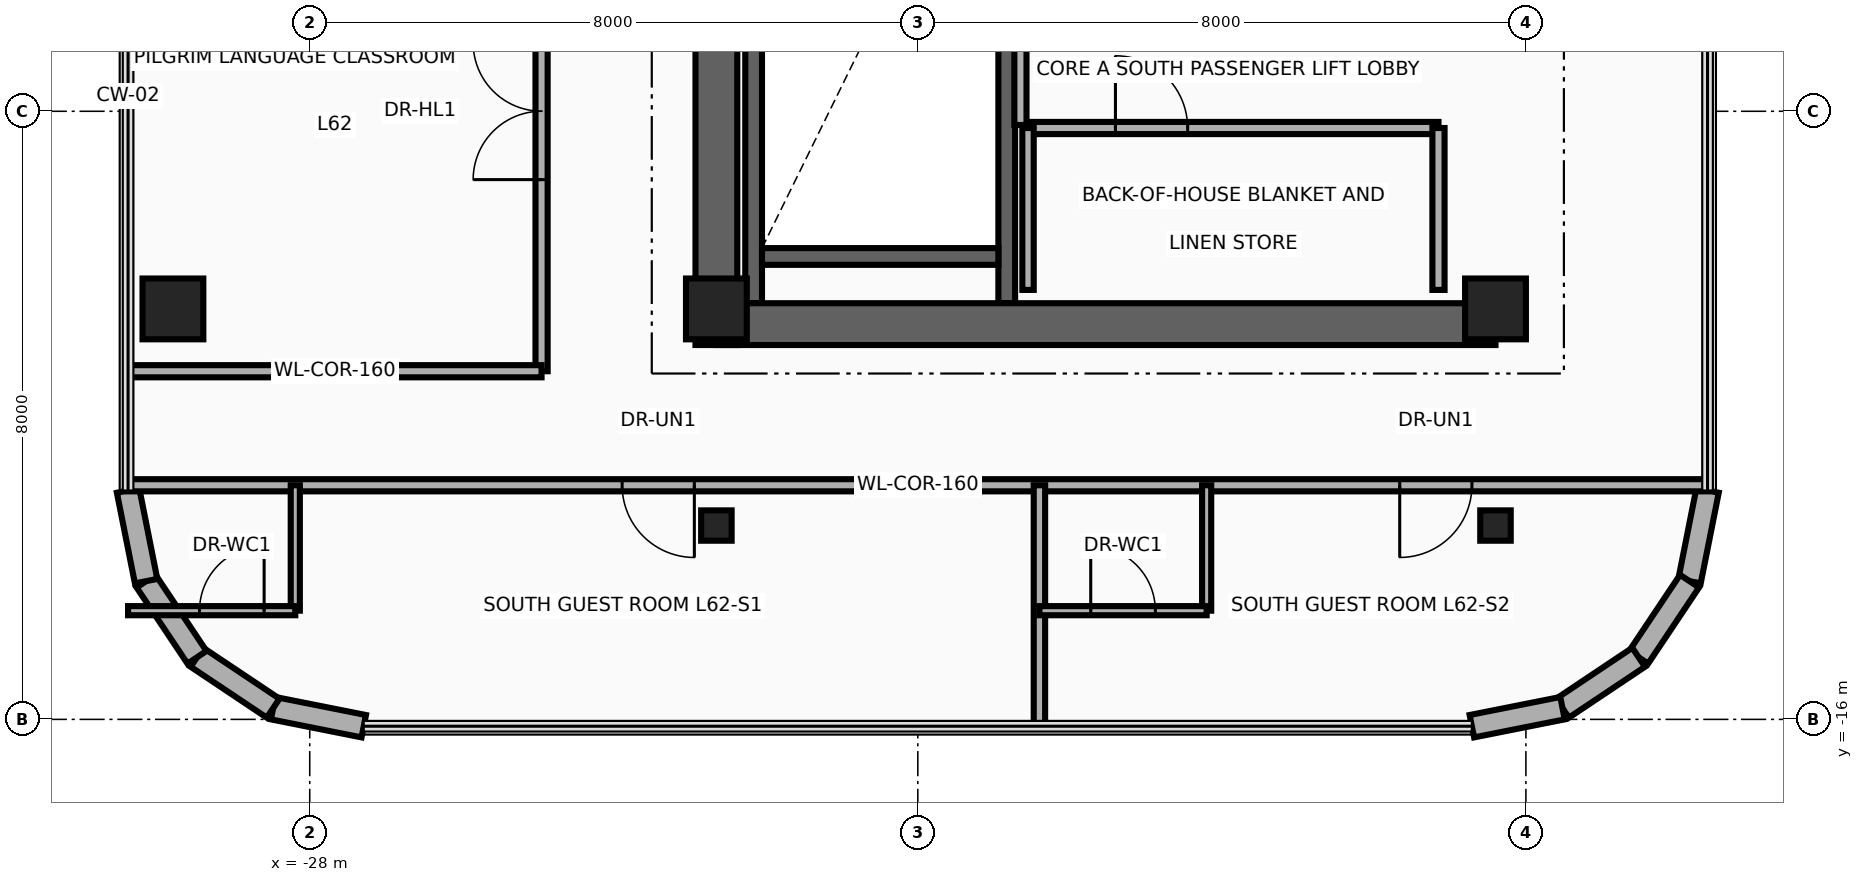
"""IFC4 building model, lengths in metres.
Left out: names, types, materials, properties, quantities, classifications, styles, units other than length and angle.
Written with IfcOpenShell. Run it as: python <this file> out.ifc"""

import sys

from ifc_helpers import new_model, si_unit, direction, frame, frame_2d, origin, origin_2d, place, context, subcontext, project, spatial, rectangle, i_section, extrude, source, transform, mapped, element, fill, save


model = new_model("IFC4")
c1 = context("Model", 3, precision=1e-05, world=origin(), true_north=direction((0.0, 1.0)))
c2 = subcontext(c1, "Body", "Model", "MODEL_VIEW")
j1 = project(units=[si_unit("LENGTHUNIT", "METRE"), si_unit("PLANEANGLEUNIT", "RADIAN")], contexts=[c1])
p1 = place(None, origin())
s1 = spatial("IfcSite", under=j1, at=p1, CompositionType="ELEMENT")
p2 = place(p1, origin())
s2 = spatial("IfcBuilding", under=s1, at=p2, CompositionType="ELEMENT")
p3 = place(p2, frame((0.0, 0.0, 240.5)))
s3 = spatial("IfcBuildingStorey", under=s2, at=p3, CompositionType="ELEMENT", Elevation=240.5)
for number, where, z_axis, x_axis in (
    (1, (-22.16, -10.525, 0.0), (0.0, 0.0, 1.0), (0.0, 1.0, 0.0)),
    (2, (-18.83, -10.525, 0.0), (0.0, 0.0, 1.0), (0.0, 1.0, 0.0)),
):
    element("IfcWall", number, at=place(p3, frame(where, z_axis=z_axis, x_axis=x_axis)), inside=s3, PredefinedType="SHEAR", context=c2, shape_type="SweptSolid", body=[
        extrude(rectangle(XDim=8.745, YDim=0.22, at=frame_2d((4.373, 0.0))), origin(), (0.0, 0.0, 1.0), 3.26),
    ])
p4 = place(p3, frame((-22.05, -9.91, 0.0), z_axis=(0.0, 0.0, 1.0), x_axis=(1.0, 0.0, 0.0)))
e3 = element("IfcWall", 3, at=p4, inside=s3, PredefinedType="SHEAR", context=c2, shape_type="SweptSolid", body=[
    extrude(rectangle(XDim=3.11, YDim=0.22, at=frame_2d((1.555, 0.0))), origin(), (0.0, 0.0, 1.0), 3.26),
])
p5 = place(p3, frame((-22.65, -11.075, 0.0), z_axis=(0.0, 0.0, 1.0), x_axis=(0.0, 1.0, 0.0)))
e4 = element("IfcWall", 4, at=p5, inside=s3, PredefinedType="SHEAR", context=c2, shape_type="SweptSolid", body=[
    extrude(rectangle(XDim=22.15, YDim=0.55, at=frame_2d((11.075, 0.0))), origin(), (0.0, 0.0, 1.0), 3.26),
])
p6 = place(p3, frame((-22.65, -10.8, 0.0), z_axis=(0.0, 0.0, 1.0), x_axis=(1.0, 0.0, 0.0)))
e5 = element("IfcWall", 5, at=p6, inside=s3, PredefinedType="SHEAR", context=c2, shape_type="SweptSolid", body=[
    extrude(rectangle(XDim=10.25, YDim=0.55, at=frame_2d((5.125, 0.0))), origin(), (0.0, 0.0, 1.0), 3.26),
])
m1 = source(origin(), c2, "Body", "SweptSolid", [
    extrude(rectangle(XDim=0.8, YDim=0.8, at=origin_2d()), origin(), (0.0, 0.0, 1.0), 3.5),
])
for number, where, z_axis, x_axis in (
    (6, (-29.8, -10.6, 0.0), (0.0, 0.0, 1.0), (1.0, 0.0, 0.0)),
    (7, (-22.65, -10.6, 0.0), (0.0, 0.0, 1.0), (1.0, 0.0, 0.0)),
    (8, (-12.4, -10.6, 0.0), (0.0, 0.0, 1.0), (1.0, 0.0, 0.0)),
):
    element("IfcColumn", number, at=place(p3, frame(where, z_axis=z_axis, x_axis=x_axis)), inside=s3, PredefinedType="COLUMN", context=c2, shape_type="MappedRepresentation", body=[
        mapped(m1, transform((0.0, 0.0, 0.0), x_axis=(1.0, 0.0, 0.0), y_axis=(0.0, 1.0, 0.0), z_axis=(0.0, 0.0, 1.0), scale=1.0)),
    ])
m2 = source(origin(), c2, "Body", "SweptSolid", [
    extrude(i_section(OverallWidth=0.401, OverallDepth=0.399, WebThickness=0.025, FlangeThickness=0.04, at=origin_2d()), origin(), (0.0, 0.0, 1.0), 3.5),
])
for number, where, z_axis, x_axis in (
    (9, (-22.65, -13.45, 0.0), (0.0, 0.0, 1.0), (1.0, 0.0, 0.0)),
    (10, (-12.4, -13.45, 0.0), (0.0, 0.0, 1.0), (1.0, 0.0, 0.0)),
):
    element("IfcColumn", number, at=place(p3, frame(where, z_axis=z_axis, x_axis=x_axis)), inside=s3, PredefinedType="COLUMN", context=c2, shape_type="MappedRepresentation", body=[
        mapped(m2, transform((0.0, 0.0, 0.0), x_axis=(1.0, 0.0, 0.0), y_axis=(0.0, 1.0, 0.0), z_axis=(0.0, 0.0, 1.0), scale=1.0)),
    ])
p7 = place(p3, frame((-9.61, -12.989, 0.0), z_axis=(0.0, 0.0, 1.0), x_axis=(-0.194996050505, -0.980804027463, 0.0)))
e11 = element("IfcWall", 11, at=p7, inside=s3, PredefinedType="SOLIDWALL", context=c2, shape_type="SweptSolid", body=[
    extrude(rectangle(XDim=1.216, YDim=0.3, at=frame_2d((0.608, 0.0))), origin(), (0.0, 0.0, 1.0), 3.26),
])
for number, where, z_axis, x_axis in (
    (12, (-9.847, -14.182, 0.0), (0.0, 0.0, 1.0), (-0.556, -0.831, 0.0)),
    (13, (-10.517, -15.183, 0.0), (0.0, 0.0, 1.0), (-0.831, -0.556, 0.0)),
):
    element("IfcWall", number, at=place(p3, frame(where, z_axis=z_axis, x_axis=x_axis)), inside=s3, PredefinedType="SOLIDWALL", context=c2, shape_type="SweptSolid", body=[
        extrude(rectangle(XDim=1.205, YDim=0.3, at=frame_2d((0.603, 0.0))), origin(), (0.0, 0.0, 1.0), 3.26),
    ])
for number, where, z_axis, x_axis in (
    (14, (-11.518, -15.853, 0.0), (0.0, 0.0, 1.0), (-0.981, -0.195, 0.0)),
    (15, (-27.289, -16.09, 0.0), (0.0, 0.0, 1.0), (-0.981, 0.195, 0.0)),
):
    element("IfcWall", number, at=place(p3, frame(where, z_axis=z_axis, x_axis=x_axis)), inside=s3, PredefinedType="SOLIDWALL", context=c2, shape_type="SweptSolid", body=[
        extrude(rectangle(XDim=1.216, YDim=0.3, at=frame_2d((0.608, 0.0))), origin(), (0.0, 0.0, 1.0), 3.26),
    ])
for number, where, z_axis, x_axis in (
    (16, (-28.482, -15.853, 0.0), (0.0, 0.0, 1.0), (-0.831, 0.556, 0.0)),
    (17, (-29.483, -15.183, 0.0), (0.0, 0.0, 1.0), (-0.556, 0.831, 0.0)),
):
    element("IfcWall", number, at=place(p3, frame(where, z_axis=z_axis, x_axis=x_axis)), inside=s3, PredefinedType="SOLIDWALL", context=c2, shape_type="SweptSolid", body=[
        extrude(rectangle(XDim=1.205, YDim=0.3, at=frame_2d((0.603, 0.0))), origin(), (0.0, 0.0, 1.0), 3.26),
    ])
p8 = place(p3, frame((-30.153, -14.182, 0.0), z_axis=(0.0, 0.0, 1.0), x_axis=(-0.194996050505, 0.980804027463, 0.0)))
e18 = element("IfcWall", 18, at=p8, inside=s3, PredefinedType="SOLIDWALL", context=c2, shape_type="SweptSolid", body=[
    extrude(rectangle(XDim=1.216, YDim=0.3, at=frame_2d((0.608, 0.0))), origin(), (0.0, 0.0, 1.0), 3.26),
])
p9 = place(p3, frame((-18.65, -8.18, 0.0), z_axis=(0.0, 0.0, 1.0), x_axis=(0.0, 1.0, 0.0)))
e19 = element("IfcWall", 19, at=p9, inside=s3, PredefinedType="PARTITIONING", context=c2, shape_type="SweptSolid", body=[
    extrude(rectangle(XDim=1.56, YDim=0.16, at=frame_2d((0.78, 0.0))), origin(), (0.0, 0.0, 1.0), 3.26),
])
p10 = place(p3, frame((-18.55, -8.22, 0.0), z_axis=(0.0, 0.0, 1.0), x_axis=(1.0, 0.0, 0.0)))
e20 = element("IfcWall", 20, at=p10, inside=s3, PredefinedType="PARTITIONING", context=c2, shape_type="SweptSolid", body=[
    extrude(rectangle(XDim=5.4, YDim=0.16, at=frame_2d((2.7, 0.0))), origin(), (0.0, 0.0, 1.0), 3.26),
])
p11 = place(p10, frame((1.15, 0.0, 0.0)))
e21 = element("IfcOpeningElement", 21, at=p11, cuts=e20, PredefinedType="OPENING", context=c2, shape_type="SweptSolid", body=[
    extrude(rectangle(XDim=0.95, YDim=2.15, at=frame_2d((0.475, 1.075))), frame((0.0, 0.095, 0.0), z_axis=(0.0, -1.0, 0.0), x_axis=(1.0, 0.0, 0.0)), (0.0, 0.0, 1.0), 0.19),
])
p12 = place(p3, frame((-18.55, -10.35, 0.0), z_axis=(0.0, 0.0, 1.0), x_axis=(0.0, 1.0, 0.0)))
e22 = element("IfcWall", 22, at=p12, inside=s3, PredefinedType="PARTITIONING", context=c2, shape_type="SweptSolid", body=[
    extrude(rectangle(XDim=2.13, YDim=0.15, at=frame_2d((1.065, 0.0))), origin(), (0.0, 0.0, 1.0), 3.26),
])
p13 = place(p3, frame((-13.15, -10.35, 0.0), z_axis=(0.0, 0.0, 1.0), x_axis=(0.0, 1.0, 0.0)))
e23 = element("IfcWall", 23, at=p13, inside=s3, PredefinedType="PARTITIONING", context=c2, shape_type="SweptSolid", body=[
    extrude(rectangle(XDim=2.13, YDim=0.16, at=frame_2d((1.065, 0.0))), origin(), (0.0, 0.0, 1.0), 3.26),
])
p14 = place(p3, frame((-24.95, -11.42, 0.0), z_axis=(0.0, 0.0, 1.0), x_axis=(0.0, 1.0, 0.0)))
e24 = element("IfcWall", 24, at=p14, inside=s3, PredefinedType="PARTITIONING", context=c2, shape_type="SweptSolid", body=[
    extrude(rectangle(XDim=20.22, YDim=0.16, at=frame_2d((10.11, 0.0))), origin(), (0.0, 0.0, 1.0), 2.544),
])
p15 = place(p14, frame((2.521, 0.0, 0.0)))
e25 = element("IfcOpeningElement", 25, at=p15, cuts=e24, PredefinedType="OPENING", context=c2, shape_type="SweptSolid", body=[
    extrude(rectangle(XDim=1.8, YDim=2.15, at=frame_2d((0.9, 1.075))), frame((0.0, 0.095, 0.0), z_axis=(0.0, -1.0, 0.0), x_axis=(1.0, 0.0, 0.0)), (0.0, 0.0, 1.0), 0.19),
])
p16 = place(p14, frame((9.124, 0.0, 0.0)))
e26 = element("IfcOpeningElement", 26, at=p16, cuts=e24, PredefinedType="OPENING", context=c2, shape_type="SweptSolid", body=[
    extrude(rectangle(XDim=0.95, YDim=2.15, at=frame_2d((0.475, 1.075))), frame((0.0, 0.095, 0.0), z_axis=(0.0, -1.0, 0.0), x_axis=(1.0, 0.0, 0.0)), (0.0, 0.0, 1.0), 0.19),
])
p17 = place(p14, frame((17.813, 0.0, 0.0)))
e27 = element("IfcOpeningElement", 27, at=p17, cuts=e24, PredefinedType="OPENING", context=c2, shape_type="SweptSolid", body=[
    extrude(rectangle(XDim=0.95, YDim=2.15, at=frame_2d((0.475, 1.075))), frame((0.0, 0.095, 0.0), z_axis=(0.0, -1.0, 0.0), x_axis=(1.0, 0.0, 0.0)), (0.0, 0.0, 1.0), 0.19),
])
p18 = place(p3, frame((-30.39, -12.92, 0.0), z_axis=(0.0, 0.0, 1.0), x_axis=(1.0, 0.0, 0.0)))
e28 = element("IfcWall", 28, at=p18, inside=s3, PredefinedType="PARTITIONING", context=c2, shape_type="SweptSolid", body=[
    extrude(rectangle(XDim=20.78, YDim=0.16, at=frame_2d((10.39, 0.0))), origin(), (0.0, 0.0, 1.0), 2.634),
])
p19 = place(p18, frame((6.5, 0.0, 0.0)))
e29 = element("IfcOpeningElement", 29, at=p19, cuts=e28, PredefinedType="OPENING", context=c2, shape_type="SweptSolid", body=[
    extrude(rectangle(XDim=0.95, YDim=2.15, at=frame_2d((0.475, 1.075))), frame((0.0, 0.095, 0.0), z_axis=(0.0, -1.0, 0.0), x_axis=(1.0, 0.0, 0.0)), (0.0, 0.0, 1.0), 0.19),
])
p20 = place(p18, frame((16.73, 0.0, 0.0)))
e30 = element("IfcOpeningElement", 30, at=p20, cuts=e28, PredefinedType="OPENING", context=c2, shape_type="SweptSolid", body=[
    extrude(rectangle(XDim=0.95, YDim=2.15, at=frame_2d((0.475, 1.075))), frame((0.0, 0.095, 0.0), z_axis=(0.0, -1.0, 0.0), x_axis=(1.0, 0.0, 0.0)), (0.0, 0.0, 1.0), 0.19),
])
p21 = place(p3, frame((-18.4, -16.09, 0.0), z_axis=(0.0, 0.0, 1.0), x_axis=(0.0, 1.0, 0.0)))
e31 = element("IfcWall", 31, at=p21, inside=s3, PredefinedType="PARTITIONING", context=c2, shape_type="SweptSolid", body=[
    extrude(rectangle(XDim=3.17, YDim=0.15, at=frame_2d((1.585, 0.0))), origin(), (0.0, 0.0, 1.0), 2.706),
])
p22 = place(p3, frame((-28.19, -14.57, 0.0), z_axis=(0.0, 0.0, 1.0), x_axis=(0.0, 1.0, 0.0)))
e32 = element("IfcWall", 32, at=p22, inside=s3, PredefinedType="PARTITIONING", context=c2, shape_type="SweptSolid", body=[
    extrude(rectangle(XDim=1.65, YDim=0.12, at=frame_2d((0.825, 0.0))), origin(), (0.0, 0.0, 1.0), 3.26),
])
p23 = place(p3, frame((-30.39, -14.57, 0.0), z_axis=(0.0, 0.0, 1.0), x_axis=(1.0, 0.0, 0.0)))
e33 = element("IfcWall", 33, at=p23, inside=s3, PredefinedType="PARTITIONING", context=c2, shape_type="SweptSolid", body=[
    extrude(rectangle(XDim=2.2, YDim=0.12, at=frame_2d((1.1, 0.0))), origin(), (0.0, 0.0, 1.0), 3.26),
])
p24 = place(p23, frame((0.94, 0.0, 0.0)))
e34 = element("IfcOpeningElement", 34, at=p24, cuts=e33, PredefinedType="OPENING", context=c2, shape_type="SweptSolid", body=[
    extrude(rectangle(XDim=0.85, YDim=2.1, at=frame_2d((0.425, 1.05))), frame((0.0, 0.075, 0.0), z_axis=(0.0, -1.0, 0.0), x_axis=(1.0, 0.0, 0.0)), (0.0, 0.0, 1.0), 0.15),
])
p25 = place(p3, frame((-16.2, -14.57, 0.0), z_axis=(0.0, 0.0, 1.0), x_axis=(0.0, 1.0, 0.0)))
e35 = element("IfcWall", 35, at=p25, inside=s3, PredefinedType="PARTITIONING", context=c2, shape_type="SweptSolid", body=[
    extrude(rectangle(XDim=1.65, YDim=0.12, at=frame_2d((0.825, 0.0))), origin(), (0.0, 0.0, 1.0), 2.706),
])
p26 = place(p3, frame((-18.4, -14.57, 0.0), z_axis=(0.0, 0.0, 1.0), x_axis=(1.0, 0.0, 0.0)))
e36 = element("IfcWall", 36, at=p26, inside=s3, PredefinedType="PARTITIONING", context=c2, shape_type="SweptSolid", body=[
    extrude(rectangle(XDim=2.2, YDim=0.12, at=frame_2d((1.1, 0.0))), origin(), (0.0, 0.0, 1.0), 3.26),
])
p27 = place(p26, frame((0.675, 0.0, 0.0)))
e37 = element("IfcOpeningElement", 37, at=p27, cuts=e36, PredefinedType="OPENING", context=c2, shape_type="SweptSolid", body=[
    extrude(rectangle(XDim=0.85, YDim=2.1, at=frame_2d((0.425, 1.05))), frame((0.0, 0.075, 0.0), z_axis=(0.0, -1.0, 0.0), x_axis=(1.0, 0.0, 0.0)), (0.0, 0.0, 1.0), 0.15),
])
p28 = place(p3, frame((-30.39, -11.42, 0.0), z_axis=(0.0, 0.0, 1.0), x_axis=(1.0, 0.0, 0.0)))
e38 = element("IfcWall", 38, at=p28, inside=s3, PredefinedType="PARTITIONING", context=c2, shape_type="SweptSolid", body=[
    extrude(rectangle(XDim=5.44, YDim=0.16, at=frame_2d((2.72, 0.0))), origin(), (0.0, 0.0, 1.0), 3.26),
])
p29 = place(p11, origin())
e39 = element("IfcDoor", 39, at=p29, inside=s3, OperationType="SINGLE_SWING_RIGHT", PredefinedType="DOOR", context=c2, shape_type="SweptSolid", body=[
    extrude(rectangle(XDim=0.95, YDim=2.15, at=frame_2d((0.475, 1.075))), frame((0.0, 0.025, 0.0), z_axis=(0.0, -1.0, 0.0), x_axis=(1.0, 0.0, 0.0)), (0.0, 0.0, 1.0), 0.05),
])
fill(e21, e39)
p30 = place(p15, origin())
e40 = element("IfcDoor", 40, at=p30, inside=s3, OperationType="DOUBLE_DOOR_SINGLE_SWING", PredefinedType="DOOR", context=c2, shape_type="SweptSolid", body=[
    extrude(rectangle(XDim=1.8, YDim=2.15, at=frame_2d((0.9, 1.075))), frame((0.0, 0.025, 0.0), z_axis=(0.0, -1.0, 0.0), x_axis=(1.0, 0.0, 0.0)), (0.0, 0.0, 1.0), 0.05),
])
fill(e25, e40)
p31 = place(p19, frame((0.95, 0.0, 0.0), z_axis=(0.0, 0.0, 1.0), x_axis=(-1.0, 0.0, 0.0)))
e41 = element("IfcDoor", 41, at=p31, inside=s3, OperationType="SINGLE_SWING_LEFT", PredefinedType="DOOR", context=c2, shape_type="SweptSolid", body=[
    extrude(rectangle(XDim=0.95, YDim=2.15, at=frame_2d((0.475, 1.075))), frame((0.0, 0.025, 0.0), z_axis=(0.0, -1.0, 0.0), x_axis=(1.0, 0.0, 0.0)), (0.0, 0.0, 1.0), 0.05),
])
fill(e29, e41)
p32 = place(p24, origin())
e42 = element("IfcDoor", 42, at=p32, inside=s3, OperationType="SINGLE_SWING_RIGHT", PredefinedType="DOOR", context=c2, shape_type="SweptSolid", body=[
    extrude(rectangle(XDim=0.85, YDim=2.1, at=frame_2d((0.425, 1.05))), frame((0.0, 0.025, 0.0), z_axis=(0.0, -1.0, 0.0), x_axis=(1.0, 0.0, 0.0)), (0.0, 0.0, 1.0), 0.05),
])
fill(e34, e42)
p33 = place(p20, frame((0.95, 0.0, 0.0), z_axis=(0.0, 0.0, 1.0), x_axis=(-1.0, 0.0, 0.0)))
e43 = element("IfcDoor", 43, at=p33, inside=s3, OperationType="SINGLE_SWING_LEFT", PredefinedType="DOOR", context=c2, shape_type="SweptSolid", body=[
    extrude(rectangle(XDim=0.95, YDim=2.15, at=frame_2d((0.475, 1.075))), frame((0.0, 0.025, 0.0), z_axis=(0.0, -1.0, 0.0), x_axis=(1.0, 0.0, 0.0)), (0.0, 0.0, 1.0), 0.05),
])
fill(e30, e43)
p34 = place(p27, origin())
e44 = element("IfcDoor", 44, at=p34, inside=s3, OperationType="SINGLE_SWING_RIGHT", PredefinedType="DOOR", context=c2, shape_type="SweptSolid", body=[
    extrude(rectangle(XDim=0.85, YDim=2.1, at=frame_2d((0.425, 1.05))), frame((0.0, 0.025, 0.0), z_axis=(0.0, -1.0, 0.0), x_axis=(1.0, 0.0, 0.0)), (0.0, 0.0, 1.0), 0.05),
])
fill(e37, e44)
save(model, sys.argv[1])
